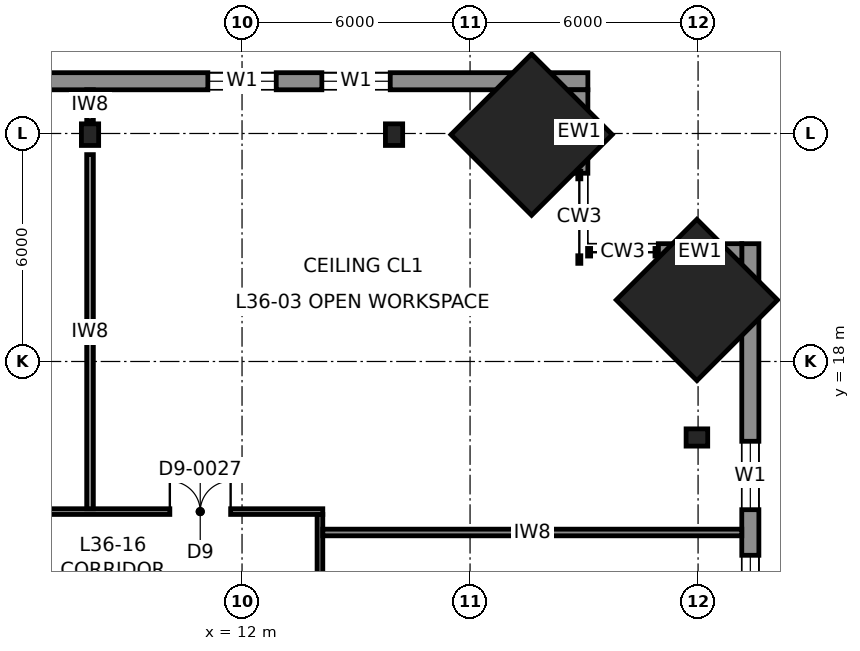
"""IFC4 building model, lengths in metres.
Left out: names, types, materials, properties, quantities, classifications, styles, units other than length and angle.
Written with IfcOpenShell. Run it as: python <this file> out.ifc"""

import sys

from ifc_helpers import new_model, si_unit, direction, frame, frame_2d, origin, origin_2d, place, context, subcontext, project, spatial, rectangle, i_section, extrude, element, fill, save


model = new_model("IFC4")
c1 = context("Model", 3, precision=1e-05, world=origin(), true_north=direction((0.0, 1.0)))
c2 = subcontext(c1, "Body", "Model", "MODEL_VIEW")
j1 = project(units=[si_unit("LENGTHUNIT", "METRE"), si_unit("PLANEANGLEUNIT", "RADIAN")], contexts=[c1])
p1 = place(None, origin())
s1 = spatial("IfcSite", under=j1, at=p1, CompositionType="ELEMENT")
p2 = place(p1, origin())
s2 = spatial("IfcBuilding", under=s1, at=p2, CompositionType="ELEMENT")
p3 = place(p2, frame((0.0, 0.0, 171.8)))
s3 = spatial("IfcBuildingStorey", under=s2, at=p3, CompositionType="ELEMENT", Elevation=171.8)
for number, where, z_axis, x_axis in (
    (1, (19.619, 23.969, 0.0), (-0.04, -0.04, 0.998), (0.707, -0.708, 0.0)),
    (2, (23.969, 19.619, 0.0), (-0.04, -0.04, 0.998), (0.708, -0.707, 0.0)),
):
    element("IfcColumn", number, at=place(p3, frame(where, z_axis=z_axis, x_axis=x_axis)), inside=s3, PredefinedType="COLUMN", context=c2, shape_type="SweptSolid", body=[
        extrude(rectangle(XDim=3.0, YDim=3.0, at=origin_2d()), origin(), (0.0, 0.0, 1.0), 4.007),
    ])
for number, where, z_axis, x_axis in (
    (3, (8.0, 23.969, 0.0), (0.0, -0.04, 0.999), (1.0, 0.0, 0.0)),
    (4, (16.0, 23.969, 0.0), (0.0, -0.04, 0.999), (1.0, 0.0, 0.0)),
    (5, (23.969, 16.0, 0.0), (-0.04, 0.0, 0.999), (0.0, -1.0, 0.0)),
):
    element("IfcColumn", number, at=place(p3, frame(where, z_axis=z_axis, x_axis=x_axis)), inside=s3, PredefinedType="COLUMN", context=c2, shape_type="SweptSolid", body=[
        extrude(i_section(OverallWidth=0.454, OverallDepth=0.569, WebThickness=0.078, FlangeThickness=0.125, at=origin_2d()), origin(), (0.0, 0.0, 1.0), 4.003),
    ])
p4 = place(p3, frame((21.1, 25.375, 0.0), z_axis=(0.0, 0.0, 1.0), x_axis=(-1.0, 0.0, 0.0)))
e6 = element("IfcWall", 6, at=p4, inside=s3, PredefinedType="SOLIDWALL", context=c2, shape_type="SweptSolid", body=[
    extrude(rectangle(XDim=42.2, YDim=0.45, at=frame_2d((21.1, 0.0))), origin(), (0.0, 0.0, 1.0), 3.83),
])
p5 = place(p4, frame((5.2, 0.0, 0.7)))
e7 = element("IfcOpeningElement", 7, at=p5, cuts=e6, PredefinedType="OPENING", context=c2, shape_type="SweptSolid", body=[
    extrude(rectangle(XDim=1.8, YDim=2.6, at=frame_2d((0.9, 1.3))), frame((0.0, 0.235, 0.0), z_axis=(0.0, -1.0, 0.0), x_axis=(1.0, 0.0, 0.0)), (0.0, 0.0, 1.0), 0.47),
])
p6 = place(p4, frame((8.2, 0.0, 0.7)))
e8 = element("IfcOpeningElement", 8, at=p6, cuts=e6, PredefinedType="OPENING", context=c2, shape_type="SweptSolid", body=[
    extrude(rectangle(XDim=1.8, YDim=2.6, at=frame_2d((0.9, 1.3))), frame((0.0, 0.235, 0.0), z_axis=(0.0, -1.0, 0.0), x_axis=(1.0, 0.0, 0.0)), (0.0, 0.0, 1.0), 0.47),
])
p7 = place(p4, frame((14.2, 0.0, 0.7)))
e9 = element("IfcOpeningElement", 9, at=p7, cuts=e6, PredefinedType="OPENING", context=c2, shape_type="SweptSolid", body=[
    extrude(rectangle(XDim=1.8, YDim=2.6, at=frame_2d((0.9, 1.3))), frame((0.0, 0.235, 0.0), z_axis=(0.0, -1.0, 0.0), x_axis=(1.0, 0.0, 0.0)), (0.0, 0.0, 1.0), 0.47),
])
p8 = place(p4, frame((17.2, 0.0, 0.7)))
e10 = element("IfcOpeningElement", 10, at=p8, cuts=e6, PredefinedType="OPENING", context=c2, shape_type="SweptSolid", body=[
    extrude(rectangle(XDim=1.8, YDim=2.6, at=frame_2d((0.9, 1.3))), frame((0.0, 0.235, 0.0), z_axis=(0.0, -1.0, 0.0), x_axis=(1.0, 0.0, 0.0)), (0.0, 0.0, 1.0), 0.47),
])
p9 = place(p4, frame((23.2, 0.0, 0.7)))
e11 = element("IfcOpeningElement", 11, at=p9, cuts=e6, PredefinedType="OPENING", context=c2, shape_type="SweptSolid", body=[
    extrude(rectangle(XDim=1.8, YDim=2.6, at=frame_2d((0.9, 1.3))), frame((0.0, 0.235, 0.0), z_axis=(0.0, -1.0, 0.0), x_axis=(1.0, 0.0, 0.0)), (0.0, 0.0, 1.0), 0.47),
])
p10 = place(p4, frame((26.2, 0.0, 0.7)))
e12 = element("IfcOpeningElement", 12, at=p10, cuts=e6, PredefinedType="OPENING", context=c2, shape_type="SweptSolid", body=[
    extrude(rectangle(XDim=1.8, YDim=2.6, at=frame_2d((0.9, 1.3))), frame((0.0, 0.235, 0.0), z_axis=(0.0, -1.0, 0.0), x_axis=(1.0, 0.0, 0.0)), (0.0, 0.0, 1.0), 0.47),
])
p11 = place(p4, frame((32.2, 0.0, 0.7)))
e13 = element("IfcOpeningElement", 13, at=p11, cuts=e6, PredefinedType="OPENING", context=c2, shape_type="SweptSolid", body=[
    extrude(rectangle(XDim=1.8, YDim=2.6, at=frame_2d((0.9, 1.3))), frame((0.0, 0.235, 0.0), z_axis=(0.0, -1.0, 0.0), x_axis=(1.0, 0.0, 0.0)), (0.0, 0.0, 1.0), 0.47),
])
p12 = place(p4, frame((35.2, 0.0, 0.7)))
e14 = element("IfcOpeningElement", 14, at=p12, cuts=e6, PredefinedType="OPENING", context=c2, shape_type="SweptSolid", body=[
    extrude(rectangle(XDim=1.8, YDim=2.6, at=frame_2d((0.9, 1.3))), frame((0.0, 0.235, 0.0), z_axis=(0.0, -1.0, 0.0), x_axis=(1.0, 0.0, 0.0)), (0.0, 0.0, 1.0), 0.47),
])
p13 = place(p3, frame((25.375, -21.1, 0.0), z_axis=(0.0, 0.0, 1.0), x_axis=(0.0, 1.0, 0.0)))
e15 = element("IfcWall", 15, at=p13, inside=s3, PredefinedType="SOLIDWALL", context=c2, shape_type="SweptSolid", body=[
    extrude(rectangle(XDim=42.2, YDim=0.45, at=frame_2d((21.1, 0.0))), origin(), (0.0, 0.0, 1.0), 3.83),
])
p14 = place(p13, frame((5.2, 0.0, 0.7)))
e16 = element("IfcOpeningElement", 16, at=p14, cuts=e15, PredefinedType="OPENING", context=c2, shape_type="SweptSolid", body=[
    extrude(rectangle(XDim=1.8, YDim=2.6, at=frame_2d((0.9, 1.3))), frame((0.0, 0.235, 0.0), z_axis=(0.0, -1.0, 0.0), x_axis=(1.0, 0.0, 0.0)), (0.0, 0.0, 1.0), 0.47),
])
p15 = place(p13, frame((8.2, 0.0, 0.7)))
e17 = element("IfcOpeningElement", 17, at=p15, cuts=e15, PredefinedType="OPENING", context=c2, shape_type="SweptSolid", body=[
    extrude(rectangle(XDim=1.8, YDim=2.6, at=frame_2d((0.9, 1.3))), frame((0.0, 0.235, 0.0), z_axis=(0.0, -1.0, 0.0), x_axis=(1.0, 0.0, 0.0)), (0.0, 0.0, 1.0), 0.47),
])
p16 = place(p13, frame((14.2, 0.0, 0.7)))
e18 = element("IfcOpeningElement", 18, at=p16, cuts=e15, PredefinedType="OPENING", context=c2, shape_type="SweptSolid", body=[
    extrude(rectangle(XDim=1.8, YDim=2.6, at=frame_2d((0.9, 1.3))), frame((0.0, 0.235, 0.0), z_axis=(0.0, -1.0, 0.0), x_axis=(1.0, 0.0, 0.0)), (0.0, 0.0, 1.0), 0.47),
])
p17 = place(p13, frame((17.2, 0.0, 0.7)))
e19 = element("IfcOpeningElement", 19, at=p17, cuts=e15, PredefinedType="OPENING", context=c2, shape_type="SweptSolid", body=[
    extrude(rectangle(XDim=1.8, YDim=2.6, at=frame_2d((0.9, 1.3))), frame((0.0, 0.235, 0.0), z_axis=(0.0, -1.0, 0.0), x_axis=(1.0, 0.0, 0.0)), (0.0, 0.0, 1.0), 0.47),
])
p18 = place(p13, frame((23.2, 0.0, 0.7)))
e20 = element("IfcOpeningElement", 20, at=p18, cuts=e15, PredefinedType="OPENING", context=c2, shape_type="SweptSolid", body=[
    extrude(rectangle(XDim=1.8, YDim=2.6, at=frame_2d((0.9, 1.3))), frame((0.0, 0.235, 0.0), z_axis=(0.0, -1.0, 0.0), x_axis=(1.0, 0.0, 0.0)), (0.0, 0.0, 1.0), 0.47),
])
p19 = place(p13, frame((26.2, 0.0, 0.7)))
e21 = element("IfcOpeningElement", 21, at=p19, cuts=e15, PredefinedType="OPENING", context=c2, shape_type="SweptSolid", body=[
    extrude(rectangle(XDim=1.8, YDim=2.6, at=frame_2d((0.9, 1.3))), frame((0.0, 0.235, 0.0), z_axis=(0.0, -1.0, 0.0), x_axis=(1.0, 0.0, 0.0)), (0.0, 0.0, 1.0), 0.47),
])
p20 = place(p13, frame((32.2, 0.0, 0.7)))
e22 = element("IfcOpeningElement", 22, at=p20, cuts=e15, PredefinedType="OPENING", context=c2, shape_type="SweptSolid", body=[
    extrude(rectangle(XDim=1.8, YDim=2.6, at=frame_2d((0.9, 1.3))), frame((0.0, 0.235, 0.0), z_axis=(0.0, -1.0, 0.0), x_axis=(1.0, 0.0, 0.0)), (0.0, 0.0, 1.0), 0.47),
])
p21 = place(p13, frame((35.2, 0.0, 0.7)))
e23 = element("IfcOpeningElement", 23, at=p21, cuts=e15, PredefinedType="OPENING", context=c2, shape_type="SweptSolid", body=[
    extrude(rectangle(XDim=1.8, YDim=2.6, at=frame_2d((0.9, 1.3))), frame((0.0, 0.235, 0.0), z_axis=(0.0, -1.0, 0.0), x_axis=(1.0, 0.0, 0.0)), (0.0, 0.0, 1.0), 0.47),
])
for number, where, z_axis, x_axis in (
    (24, (20.875, 22.954, 0.0), (0.0, 0.0, 1.0), (0.0, 1.0, 0.0)),
    (25, (22.954, 20.875, 0.0), (0.0, 0.0, 1.0), (1.0, 0.0, 0.0)),
):
    element("IfcWall", number, at=place(p3, frame(where, z_axis=z_axis, x_axis=x_axis)), inside=s3, PredefinedType="SOLIDWALL", context=c2, shape_type="SweptSolid", body=[
        extrude(rectangle(XDim=2.196, YDim=0.45, at=frame_2d((1.098, 0.0))), origin(), (0.0, 0.0, 1.0), 3.83),
    ])
p22 = place(p3, frame((-14.125, 14.05, 0.0), z_axis=(0.0, 0.0, 1.0), x_axis=(1.0, 0.0, 0.0)))
e26 = element("IfcWall", 26, at=p22, inside=s3, PredefinedType="PARTITIONING", context=c2, shape_type="SweptSolid", body=[
    extrude(rectangle(XDim=28.25, YDim=0.15, at=frame_2d((14.125, 0.0))), origin(), (0.0, 0.0, 1.0), 3.83),
])
p23 = place(p22, frame((2.425, 0.0, 0.0)))
e27 = element("IfcOpeningElement", 27, at=p23, cuts=e26, PredefinedType="OPENING", context=c2, shape_type="SweptSolid", body=[
    extrude(rectangle(XDim=1.6, YDim=2.3, at=frame_2d((0.8, 1.15))), frame((0.0, 0.085, 0.0), z_axis=(0.0, -1.0, 0.0), x_axis=(1.0, 0.0, 0.0)), (0.0, 0.0, 1.0), 0.17),
])
p24 = place(p22, frame((13.625, 0.0, 0.0)))
e28 = element("IfcOpeningElement", 28, at=p24, cuts=e26, PredefinedType="OPENING", context=c2, shape_type="SweptSolid", body=[
    extrude(rectangle(XDim=1.0, YDim=2.3, at=frame_2d((0.5, 1.15))), frame((0.0, 0.085, 0.0), z_axis=(0.0, -1.0, 0.0), x_axis=(1.0, 0.0, 0.0)), (0.0, 0.0, 1.0), 0.17),
])
p25 = place(p22, frame((24.225, 0.0, 0.0)))
e29 = element("IfcOpeningElement", 29, at=p25, cuts=e26, PredefinedType="OPENING", context=c2, shape_type="SweptSolid", body=[
    extrude(rectangle(XDim=1.6, YDim=2.3, at=frame_2d((0.8, 1.15))), frame((0.0, 0.085, 0.0), z_axis=(0.0, -1.0, 0.0), x_axis=(1.0, 0.0, 0.0)), (0.0, 0.0, 1.0), 0.17),
])
p26 = place(p22, frame((8.625, 0.0, 0.0)))
e30 = element("IfcOpeningElement", 30, at=p26, cuts=e26, PredefinedType="OPENING", context=c2, shape_type="SweptSolid", body=[
    extrude(rectangle(XDim=1.0, YDim=2.3, at=frame_2d((0.5, 1.15))), frame((0.0, 0.085, 0.0), z_axis=(0.0, -1.0, 0.0), x_axis=(1.0, 0.0, 0.0)), (0.0, 0.0, 1.0), 0.17),
])
p27 = place(p22, frame((18.625, 0.0, 0.0)))
e31 = element("IfcOpeningElement", 31, at=p27, cuts=e26, PredefinedType="OPENING", context=c2, shape_type="SweptSolid", body=[
    extrude(rectangle(XDim=1.0, YDim=2.3, at=frame_2d((0.5, 1.15))), frame((0.0, 0.085, 0.0), z_axis=(0.0, -1.0, 0.0), x_axis=(1.0, 0.0, 0.0)), (0.0, 0.0, 1.0), 0.17),
])
p28 = place(p3, frame((14.05, -13.575, 0.0), z_axis=(0.0, 0.0, 1.0), x_axis=(0.0, 1.0, 0.0)))
e32 = element("IfcWall", 32, at=p28, inside=s3, PredefinedType="PARTITIONING", context=c2, shape_type="SweptSolid", body=[
    extrude(rectangle(XDim=27.55, YDim=0.15, at=frame_2d((13.775, 0.0))), origin(), (0.0, 0.0, 1.0), 3.83),
])
p29 = place(p28, frame((3.175, 0.0, 0.0)))
e33 = element("IfcOpeningElement", 33, at=p29, cuts=e32, PredefinedType="OPENING", context=c2, shape_type="SweptSolid", body=[
    extrude(rectangle(XDim=1.0, YDim=2.3, at=frame_2d((0.5, 1.15))), frame((0.0, 0.085, 0.0), z_axis=(0.0, -1.0, 0.0), x_axis=(1.0, 0.0, 0.0)), (0.0, 0.0, 1.0), 0.17),
])
p30 = place(p28, frame((22.375, 0.0, 0.0)))
e34 = element("IfcOpeningElement", 34, at=p30, cuts=e32, PredefinedType="OPENING", context=c2, shape_type="SweptSolid", body=[
    extrude(rectangle(XDim=1.6, YDim=2.3, at=frame_2d((0.8, 1.15))), frame((0.0, 0.085, 0.0), z_axis=(0.0, -1.0, 0.0), x_axis=(1.0, 0.0, 0.0)), (0.0, 0.0, 1.0), 0.17),
])
p31 = place(p28, frame((16.825, 0.0, 0.0)))
e35 = element("IfcOpeningElement", 35, at=p31, cuts=e32, PredefinedType="OPENING", context=c2, shape_type="SweptSolid", body=[
    extrude(rectangle(XDim=1.0, YDim=2.3, at=frame_2d((0.5, 1.15))), frame((0.0, 0.085, 0.0), z_axis=(0.0, -1.0, 0.0), x_axis=(1.0, 0.0, 0.0)), (0.0, 0.0, 1.0), 0.17),
])
p32 = place(p28, frame((9.825, 0.0, 0.0)))
e36 = element("IfcOpeningElement", 36, at=p32, cuts=e32, PredefinedType="OPENING", context=c2, shape_type="SweptSolid", body=[
    extrude(rectangle(XDim=1.0, YDim=2.3, at=frame_2d((0.5, 1.15))), frame((0.0, 0.085, 0.0), z_axis=(0.0, -1.0, 0.0), x_axis=(1.0, 0.0, 0.0)), (0.0, 0.0, 1.0), 0.17),
])
p33 = place(p3, frame((14.125, 13.5, 0.0), z_axis=(0.0, 0.0, 1.0), x_axis=(1.0, 0.0, 0.0)))
e37 = element("IfcWall", 37, at=p33, inside=s3, PredefinedType="PARTITIONING", context=c2, shape_type="SweptSolid", body=[
    extrude(rectangle(XDim=11.025, YDim=0.175, at=frame_2d((5.512, 0.0))), origin(), (0.0, 0.0, 1.0), 3.83),
])
p34 = place(p3, frame((8.0, 14.125, 0.0), z_axis=(0.0, 0.0, 1.0), x_axis=(0.0, 1.0, 0.0)))
e38 = element("IfcWall", 38, at=p34, inside=s3, PredefinedType="PARTITIONING", context=c2, shape_type="SweptSolid", body=[
    extrude(rectangle(XDim=9.319, YDim=0.175, at=frame_2d((4.66, 0.0))), origin(), (0.0, 0.0, 1.0), 2.84),
])
p35 = place(p3, frame((8.0, 24.333, 0.0), z_axis=(0.0, 0.0, 1.0), x_axis=(0.0, 1.0, 0.0)))
e39 = element("IfcWall", 39, at=p35, inside=s3, PredefinedType="PARTITIONING", context=c2, shape_type="SweptSolid", body=[
    extrude(rectangle(XDim=0.817, YDim=0.175, at=frame_2d((0.408, 0.0))), origin(), (0.0, 0.0, 1.0), 3.83),
])
p36 = place(p5, origin())
e40 = element("IfcWindow", 40, at=p36, inside=s3, PartitioningType="SINGLE_PANEL", PredefinedType="WINDOW", context=c2, shape_type="SweptSolid", body=[
    extrude(rectangle(XDim=1.8, YDim=2.6, at=frame_2d((0.9, 1.3))), frame((0.0, 0.03, 0.0), z_axis=(0.0, -1.0, 0.0), x_axis=(1.0, 0.0, 0.0)), (0.0, 0.0, 1.0), 0.06),
])
fill(e7, e40)
p37 = place(p6, origin())
e41 = element("IfcWindow", 41, at=p37, inside=s3, PartitioningType="SINGLE_PANEL", PredefinedType="WINDOW", context=c2, shape_type="SweptSolid", body=[
    extrude(rectangle(XDim=1.8, YDim=2.6, at=frame_2d((0.9, 1.3))), frame((0.0, 0.03, 0.0), z_axis=(0.0, -1.0, 0.0), x_axis=(1.0, 0.0, 0.0)), (0.0, 0.0, 1.0), 0.06),
])
fill(e8, e41)
p38 = place(p20, origin())
e42 = element("IfcWindow", 42, at=p38, inside=s3, PartitioningType="SINGLE_PANEL", PredefinedType="WINDOW", context=c2, shape_type="SweptSolid", body=[
    extrude(rectangle(XDim=1.8, YDim=2.6, at=frame_2d((0.9, 1.3))), frame((0.0, 0.03, 0.0), z_axis=(0.0, -1.0, 0.0), x_axis=(1.0, 0.0, 0.0)), (0.0, 0.0, 1.0), 0.06),
])
fill(e22, e42)
p39 = place(p21, origin())
e43 = element("IfcWindow", 43, at=p39, inside=s3, PartitioningType="SINGLE_PANEL", PredefinedType="WINDOW", context=c2, shape_type="SweptSolid", body=[
    extrude(rectangle(XDim=1.8, YDim=2.6, at=frame_2d((0.9, 1.3))), frame((0.0, 0.03, 0.0), z_axis=(0.0, -1.0, 0.0), x_axis=(1.0, 0.0, 0.0)), (0.0, 0.0, 1.0), 0.06),
])
fill(e23, e43)
p40 = place(p25, origin())
e44 = element("IfcDoor", 44, at=p40, inside=s3, OperationType="DOUBLE_DOOR_SINGLE_SWING", PredefinedType="DOOR", context=c2, shape_type="SweptSolid", body=[
    extrude(rectangle(XDim=1.6, YDim=2.3, at=frame_2d((0.8, 1.15))), frame((0.0, 0.025, 0.0), z_axis=(0.0, -1.0, 0.0), x_axis=(1.0, 0.0, 0.0)), (0.0, 0.0, 1.0), 0.05),
])
fill(e29, e44)
save(model, sys.argv[1])
